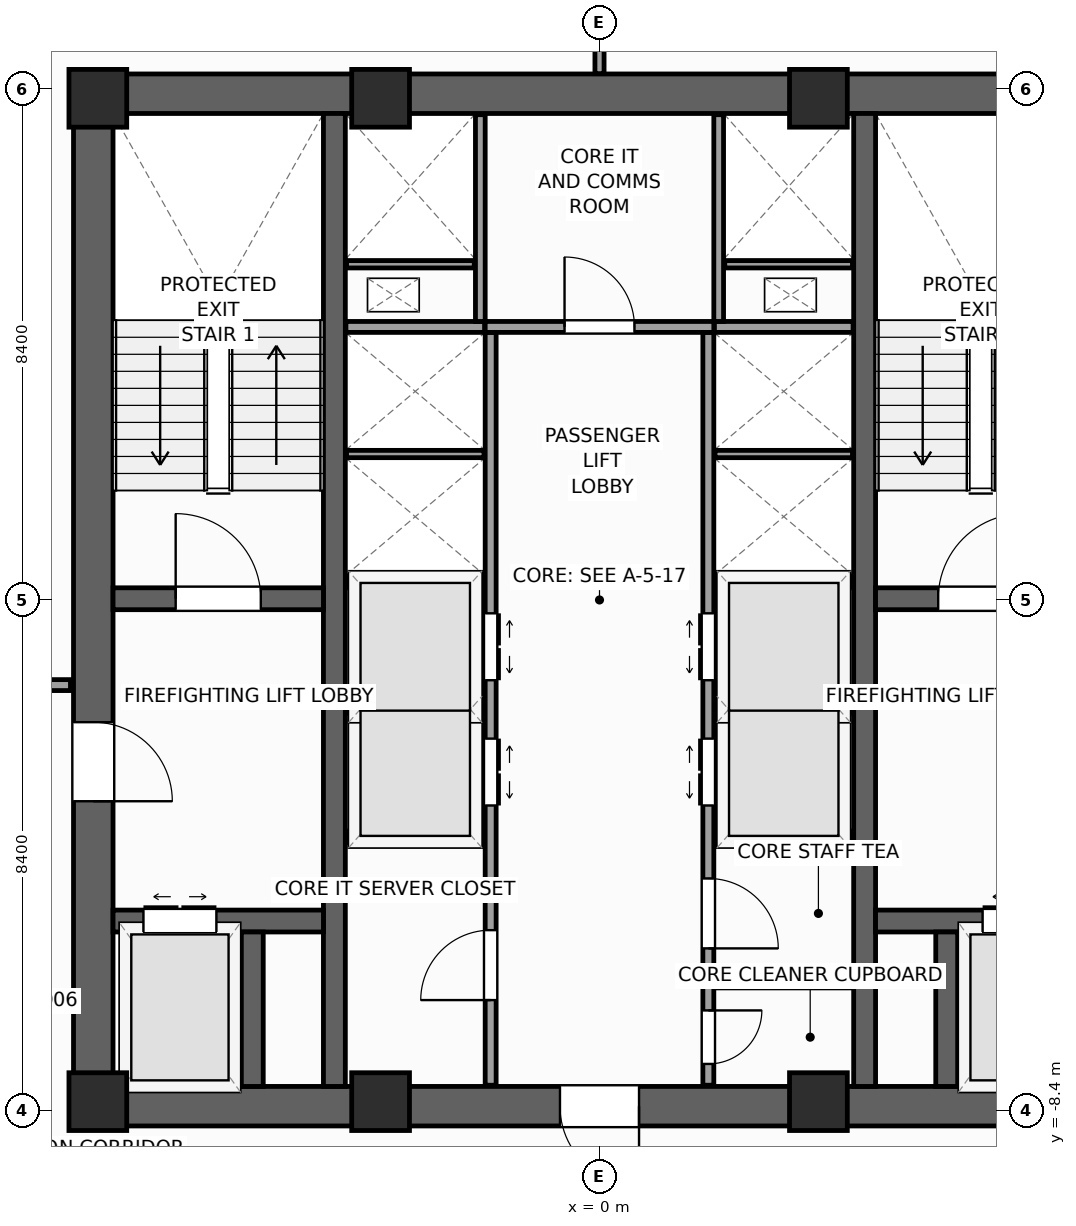
"""IFC4 building model, lengths in metres.
Left out: names, types, materials, properties, quantities, classifications, styles, units other than length and angle.
Written with IfcOpenShell. Run it as: python <this file> out.ifc"""

import sys

from ifc_helpers import new_model, si_unit, direction, frame, frame_2d, origin, origin_2d, place, context, subcontext, project, spatial, rectangle, extrude, source, transform, mapped, element, fill, save


model = new_model("IFC4")
c1 = context("Model", 3, precision=1e-05, world=origin(), true_north=direction((0.0, 1.0)))
c2 = subcontext(c1, "Body", "Model", "MODEL_VIEW")
j1 = project(units=[si_unit("LENGTHUNIT", "METRE"), si_unit("PLANEANGLEUNIT", "RADIAN")], contexts=[c1])
p1 = place(None, origin())
s1 = spatial("IfcSite", under=j1, at=p1, CompositionType="ELEMENT")
p2 = place(p1, origin())
s2 = spatial("IfcBuilding", under=s1, at=p2, CompositionType="ELEMENT")
p3 = place(p2, frame((0.0, 0.0, 152.4)))
s3 = spatial("IfcBuildingStorey", under=s2, at=p3, CompositionType="ELEMENT", Elevation=152.4)
p4 = place(p3, frame((-8.65, -8.325, 0.0), z_axis=(0.0, 0.0, 1.0), x_axis=(1.0, 0.0, 0.0)))
e1 = element("IfcWall", 1, at=p4, inside=s3, PredefinedType="SHEAR", context=c2, shape_type="SweptSolid", body=[
    extrude(rectangle(XDim=17.3, YDim=0.65, at=frame_2d((8.65, 0.0))), origin(), (0.0, 0.0, 1.0), 4.0),
])
p5 = place(p4, frame((8.0, 0.0, 0.0)))
e2 = element("IfcOpeningElement", 2, at=p5, cuts=e1, PredefinedType="OPENING", context=c2, shape_type="SweptSolid", body=[
    extrude(rectangle(XDim=1.3, YDim=2.2, at=frame_2d((0.65, 1.1))), frame((0.0, 0.335, 0.0), z_axis=(0.0, -1.0, 0.0), x_axis=(1.0, 0.0, 0.0)), (0.0, 0.0, 1.0), 0.67),
])
p6 = place(p3, frame((-8.65, 8.325, 0.0), z_axis=(0.0, 0.0, 1.0), x_axis=(1.0, 0.0, 0.0)))
e3 = element("IfcWall", 3, at=p6, inside=s3, PredefinedType="SHEAR", context=c2, shape_type="SweptSolid", body=[
    extrude(rectangle(XDim=17.3, YDim=0.65, at=frame_2d((8.65, 0.0))), origin(), (0.0, 0.0, 1.0), 4.0),
])
p7 = place(p3, frame((-8.325, -8.0, 0.0), z_axis=(0.0, 0.0, 1.0), x_axis=(0.0, 1.0, 0.0)))
e4 = element("IfcWall", 4, at=p7, inside=s3, PredefinedType="SHEAR", context=c2, shape_type="SweptSolid", body=[
    extrude(rectangle(XDim=16.0, YDim=0.65, at=frame_2d((8.0, 0.0))), origin(), (0.0, 0.0, 1.0), 4.0),
])
p8 = place(p7, frame((4.69, 0.0, 0.0)))
e5 = element("IfcOpeningElement", 5, at=p8, cuts=e4, PredefinedType="OPENING", context=c2, shape_type="SweptSolid", body=[
    extrude(rectangle(XDim=1.3, YDim=2.2, at=frame_2d((0.65, 1.1))), frame((0.0, 0.335, 0.0), z_axis=(0.0, -1.0, 0.0), x_axis=(1.0, 0.0, 0.0)), (0.0, 0.0, 1.0), 0.67),
])
for number, where, z_axis, x_axis in (
    (6, (-4.36, -8.0, 0.0), (0.0, 0.0, 1.0), (0.0, 1.0, 0.0)),
    (7, (4.36, -8.0, 0.0), (0.0, 0.0, 1.0), (0.0, 1.0, 0.0)),
):
    element("IfcWall", number, at=place(p3, frame(where, z_axis=z_axis, x_axis=x_axis)), inside=s3, PredefinedType="SHEAR", context=c2, shape_type="SweptSolid", body=[
        extrude(rectangle(XDim=16.0, YDim=0.36, at=frame_2d((8.0, 0.0))), origin(), (0.0, 0.0, 1.0), 4.0),
    ])
p9 = place(p3, frame((-8.0, 0.02, 0.0), z_axis=(0.0, 0.0, 1.0), x_axis=(1.0, 0.0, 0.0)))
e8 = element("IfcWall", 8, at=p9, inside=s3, PredefinedType="SHEAR", context=c2, shape_type="SweptSolid", body=[
    extrude(rectangle(XDim=3.46, YDim=0.36, at=frame_2d((1.73, 0.0))), origin(), (0.0, 0.0, 1.0), 4.0),
])
p10 = place(p9, frame((1.03, 0.0, 0.0)))
e9 = element("IfcOpeningElement", 9, at=p10, cuts=e8, PredefinedType="OPENING", context=c2, shape_type="SweptSolid", body=[
    extrude(rectangle(XDim=1.4, YDim=2.2, at=frame_2d((0.7, 1.1))), frame((0.0, 0.19, 0.0), z_axis=(0.0, -1.0, 0.0), x_axis=(1.0, 0.0, 0.0)), (0.0, 0.0, 1.0), 0.38),
])
p11 = place(p3, frame((4.54, 0.02, 0.0), z_axis=(0.0, 0.0, 1.0), x_axis=(1.0, 0.0, 0.0)))
e10 = element("IfcWall", 10, at=p11, inside=s3, PredefinedType="SHEAR", context=c2, shape_type="SweptSolid", body=[
    extrude(rectangle(XDim=3.46, YDim=0.36, at=frame_2d((1.73, 0.0))), origin(), (0.0, 0.0, 1.0), 4.0),
])
p12 = place(p11, frame((1.03, 0.0, 0.0)))
e11 = element("IfcOpeningElement", 11, at=p12, cuts=e10, PredefinedType="OPENING", context=c2, shape_type="SweptSolid", body=[
    extrude(rectangle(XDim=1.4, YDim=2.2, at=frame_2d((0.7, 1.1))), frame((0.0, 0.19, 0.0), z_axis=(0.0, -1.0, 0.0), x_axis=(1.0, 0.0, 0.0)), (0.0, 0.0, 1.0), 0.38),
])
p13 = place(p3, frame((-8.0, -5.28, 0.0), z_axis=(0.0, 0.0, 1.0), x_axis=(1.0, 0.0, 0.0)))
e12 = element("IfcWall", 12, at=p13, inside=s3, PredefinedType="SHEAR", context=c2, shape_type="SweptSolid", body=[
    extrude(rectangle(XDim=3.46, YDim=0.36, at=frame_2d((1.73, 0.0))), origin(), (0.0, 0.0, 1.0), 4.0),
])
p14 = place(p13, frame((0.5, 0.0, 0.0)))
e13 = element("IfcOpeningElement", 13, at=p14, cuts=e12, PredefinedType="OPENING", context=c2, shape_type="SweptSolid", body=[
    extrude(rectangle(XDim=1.2, YDim=2.25, at=frame_2d((0.6, 1.125))), frame((0.0, 0.19, 0.0), z_axis=(0.0, -1.0, 0.0), x_axis=(1.0, 0.0, 0.0)), (0.0, 0.0, 1.0), 0.38),
])
p15 = place(p3, frame((4.54, -5.28, 0.0), z_axis=(0.0, 0.0, 1.0), x_axis=(1.0, 0.0, 0.0)))
e14 = element("IfcWall", 14, at=p15, inside=s3, PredefinedType="SHEAR", context=c2, shape_type="SweptSolid", body=[
    extrude(rectangle(XDim=3.46, YDim=0.36, at=frame_2d((1.73, 0.0))), origin(), (0.0, 0.0, 1.0), 4.0),
])
p16 = place(p15, frame((1.76, 0.0, 0.0)))
e15 = element("IfcOpeningElement", 15, at=p16, cuts=e14, PredefinedType="OPENING", context=c2, shape_type="SweptSolid", body=[
    extrude(rectangle(XDim=1.2, YDim=2.25, at=frame_2d((0.6, 1.125))), frame((0.0, 0.19, 0.0), z_axis=(0.0, -1.0, 0.0), x_axis=(1.0, 0.0, 0.0)), (0.0, 0.0, 1.0), 0.38),
])
for number, where, z_axis, x_axis in (
    (16, (-5.71, -8.0, 0.0), (0.0, 0.0, 1.0), (0.0, 1.0, 0.0)),
    (17, (5.71, -8.0, 0.0), (0.0, 0.0, 1.0), (0.0, 1.0, 0.0)),
):
    element("IfcWall", number, at=place(p3, frame(where, z_axis=z_axis, x_axis=x_axis)), inside=s3, PredefinedType="SHEAR", context=c2, shape_type="SweptSolid", body=[
        extrude(rectangle(XDim=2.54, YDim=0.36, at=frame_2d((1.27, 0.0))), origin(), (0.0, 0.0, 1.0), 4.0),
    ])
m1 = source(origin(), c2, "Body", "SweptSolid", [
    extrude(rectangle(XDim=0.95, YDim=0.95, at=origin_2d()), origin(), (0.0, 0.0, 1.0), 4.0),
])
for number, where, z_axis, x_axis in (
    (18, (-8.25, -8.25, 0.0), (0.0, 0.0, 1.0), (1.0, 0.0, 0.0)),
    (19, (-8.25, 8.25, 0.0), (0.0, 0.0, 1.0), (1.0, 0.0, 0.0)),
    (20, (-3.6, -8.25, 0.0), (0.0, 0.0, 1.0), (1.0, 0.0, 0.0)),
    (21, (3.6, -8.25, 0.0), (0.0, 0.0, 1.0), (1.0, 0.0, 0.0)),
    (22, (-3.6, 8.25, 0.0), (0.0, 0.0, 1.0), (1.0, 0.0, 0.0)),
    (23, (3.6, 8.25, 0.0), (0.0, 0.0, 1.0), (1.0, 0.0, 0.0)),
):
    element("IfcColumn", number, at=place(p3, frame(where, z_axis=z_axis, x_axis=x_axis)), inside=s3, PredefinedType="PILASTER", context=c2, shape_type="MappedRepresentation", body=[
        mapped(m1, transform((0.0, 0.0, 0.0), scale=1.0)),
    ])
p17 = place(p3, frame((-1.79, -7.98, 0.0), z_axis=(0.0, 0.0, 1.0), x_axis=(0.0, 1.0, 0.0)))
e24 = element("IfcWall", 24, at=p17, inside=s3, PredefinedType="PARTITIONING", context=c2, shape_type="SweptSolid", body=[
    extrude(rectangle(XDim=12.38, YDim=0.18, at=frame_2d((6.19, 0.0))), origin(), (0.0, 0.0, 1.0), 3.74),
])
p18 = place(p17, frame((4.6, 0.0, 0.0)))
e25 = element("IfcOpeningElement", 25, at=p18, cuts=e24, PredefinedType="OPENING", context=c2, shape_type="SweptSolid", body=[
    extrude(rectangle(XDim=1.1, YDim=2.2, at=frame_2d((0.55, 1.1))), frame((0.0, 0.1, 0.0), z_axis=(0.0, -1.0, 0.0), x_axis=(1.0, 0.0, 0.0)), (0.0, 0.0, 1.0), 0.2),
])
p19 = place(p17, frame((6.66, 0.0, 0.0)))
e26 = element("IfcOpeningElement", 26, at=p19, cuts=e24, PredefinedType="OPENING", context=c2, shape_type="SweptSolid", body=[
    extrude(rectangle(XDim=1.1, YDim=2.2, at=frame_2d((0.55, 1.1))), frame((0.0, 0.1, 0.0), z_axis=(0.0, -1.0, 0.0), x_axis=(1.0, 0.0, 0.0)), (0.0, 0.0, 1.0), 0.2),
])
p20 = place(p17, frame((1.4, 0.0, 0.0)))
e27 = element("IfcOpeningElement", 27, at=p20, cuts=e24, PredefinedType="OPENING", context=c2, shape_type="SweptSolid", body=[
    extrude(rectangle(XDim=1.15, YDim=2.25, at=frame_2d((0.575, 1.125))), frame((0.0, 0.1, 0.0), z_axis=(0.0, -1.0, 0.0), x_axis=(1.0, 0.0, 0.0)), (0.0, 0.0, 1.0), 0.2),
])
p21 = place(p3, frame((1.79, -7.98, 0.0), z_axis=(0.0, 0.0, 1.0), x_axis=(0.0, 1.0, 0.0)))
e28 = element("IfcWall", 28, at=p21, inside=s3, PredefinedType="PARTITIONING", context=c2, shape_type="SweptSolid", body=[
    extrude(rectangle(XDim=12.38, YDim=0.18, at=frame_2d((6.19, 0.0))), origin(), (0.0, 0.0, 1.0), 3.74),
])
p22 = place(p21, frame((4.6, 0.0, 0.0)))
e29 = element("IfcOpeningElement", 29, at=p22, cuts=e28, PredefinedType="OPENING", context=c2, shape_type="SweptSolid", body=[
    extrude(rectangle(XDim=1.1, YDim=2.2, at=frame_2d((0.55, 1.1))), frame((0.0, 0.1, 0.0), z_axis=(0.0, -1.0, 0.0), x_axis=(1.0, 0.0, 0.0)), (0.0, 0.0, 1.0), 0.2),
])
p23 = place(p21, frame((6.66, 0.0, 0.0)))
e30 = element("IfcOpeningElement", 30, at=p23, cuts=e28, PredefinedType="OPENING", context=c2, shape_type="SweptSolid", body=[
    extrude(rectangle(XDim=1.1, YDim=2.2, at=frame_2d((0.55, 1.1))), frame((0.0, 0.1, 0.0), z_axis=(0.0, -1.0, 0.0), x_axis=(1.0, 0.0, 0.0)), (0.0, 0.0, 1.0), 0.2),
])
p24 = place(p21, frame((0.35, 0.0, 0.0)))
e31 = element("IfcOpeningElement", 31, at=p24, cuts=e28, PredefinedType="OPENING", context=c2, shape_type="SweptSolid", body=[
    extrude(rectangle(XDim=0.88, YDim=2.1, at=frame_2d((0.44, 1.05))), frame((0.0, 0.1, 0.0), z_axis=(0.0, -1.0, 0.0), x_axis=(1.0, 0.0, 0.0)), (0.0, 0.0, 1.0), 0.2),
])
p25 = place(p21, frame((2.25, 0.0, 0.0)))
e32 = element("IfcOpeningElement", 32, at=p25, cuts=e28, PredefinedType="OPENING", context=c2, shape_type="SweptSolid", body=[
    extrude(rectangle(XDim=1.15, YDim=2.25, at=frame_2d((0.575, 1.125))), frame((0.0, 0.1, 0.0), z_axis=(0.0, -1.0, 0.0), x_axis=(1.0, 0.0, 0.0)), (0.0, 0.0, 1.0), 0.2),
])
p26 = place(p3, frame((-1.88, 4.49, 0.0), z_axis=(0.0, 0.0, 1.0), x_axis=(1.0, 0.0, 0.0)))
e33 = element("IfcWall", 33, at=p26, inside=s3, PredefinedType="PARTITIONING", context=c2, shape_type="SweptSolid", body=[
    extrude(rectangle(XDim=3.76, YDim=0.18, at=frame_2d((1.88, 0.0))), origin(), (0.0, 0.0, 1.0), 3.74),
])
p27 = place(p26, frame((1.305, 0.0, 0.0)))
e34 = element("IfcOpeningElement", 34, at=p27, cuts=e33, PredefinedType="OPENING", context=c2, shape_type="SweptSolid", body=[
    extrude(rectangle(XDim=1.15, YDim=2.25, at=frame_2d((0.575, 1.125))), frame((0.0, 0.1, 0.0), z_axis=(0.0, -1.0, 0.0), x_axis=(1.0, 0.0, 0.0)), (0.0, 0.0, 1.0), 0.2),
])
for number, where, z_axis, x_axis in (
    (35, (-4.17, -3.9, 0.0), (0.0, 0.0, 1.0), (1.0, 0.0, 0.0)),
    (36, (1.89, -3.9, 0.0), (0.0, 0.0, 1.0), (1.0, 0.0, 0.0)),
    (37, (-4.17, 0.3, 0.0), (0.0, 0.0, 1.0), (1.0, 0.0, 0.0)),
    (38, (1.89, 0.3, 0.0), (0.0, 0.0, 1.0), (1.0, 0.0, 0.0)),
    (39, (-4.17, 4.49, 0.0), (0.0, 0.0, 1.0), (1.0, 0.0, 0.0)),
    (40, (1.89, 4.49, 0.0), (0.0, 0.0, 1.0), (1.0, 0.0, 0.0)),
):
    element("IfcWall", number, at=place(p3, frame(where, z_axis=z_axis, x_axis=x_axis)), inside=s3, PredefinedType="PARTITIONING", context=c2, shape_type="SweptSolid", body=[
        extrude(rectangle(XDim=2.28, YDim=0.18, at=frame_2d((1.14, 0.0))), origin(), (0.0, 0.0, 1.0), 3.74),
    ])
for number, where, z_axis, x_axis in (
    (41, (-4.16, -1.8, 0.0), (0.0, 0.0, 1.0), (1.0, 0.0, 0.0)),
    (42, (1.9, -1.8, 0.0), (0.0, 0.0, 1.0), (1.0, 0.0, 0.0)),
    (43, (-4.16, 2.4, 0.0), (0.0, 0.0, 1.0), (1.0, 0.0, 0.0)),
    (44, (1.9, 2.4, 0.0), (0.0, 0.0, 1.0), (1.0, 0.0, 0.0)),
):
    element("IfcWall", number, at=place(p3, frame(where, z_axis=z_axis, x_axis=x_axis)), inside=s3, PredefinedType="PARTITIONING", context=c2, shape_type="SweptSolid", body=[
        extrude(rectangle(XDim=2.26, YDim=0.12, at=frame_2d((1.13, 0.0))), origin(), (0.0, 0.0, 1.0), 3.74),
    ])
p28 = place(p3, frame((1.89, -6.3, 0.0), z_axis=(0.0, 0.0, 1.0), x_axis=(1.0, 0.0, 0.0)))
e45 = element("IfcWall", 45, at=p28, inside=s3, PredefinedType="PARTITIONING", context=c2, shape_type="SweptSolid", body=[
    extrude(rectangle(XDim=2.28, YDim=0.16, at=frame_2d((1.14, 0.0))), origin(), (0.0, 0.0, 1.0), 3.74),
])
for number, where, z_axis, x_axis in (
    (46, (-1.96, 4.58, 0.0), (0.0, 0.0, 1.0), (0.0, 1.0, 0.0)),
    (47, (1.96, 4.58, 0.0), (0.0, 0.0, 1.0), (0.0, 1.0, 0.0)),
):
    element("IfcWall", number, at=place(p3, frame(where, z_axis=z_axis, x_axis=x_axis)), inside=s3, PredefinedType="PARTITIONING", context=c2, shape_type="SweptSolid", body=[
        extrude(rectangle(XDim=3.4, YDim=0.16, at=frame_2d((1.7, 0.0))), origin(), (0.0, 0.0, 1.0), 3.74),
    ])
for number, where, z_axis, x_axis in (
    (48, (-4.16, 5.52, 0.0), (0.0, 0.0, 1.0), (1.0, 0.0, 0.0)),
    (49, (2.06, 5.52, 0.0), (0.0, 0.0, 1.0), (1.0, 0.0, 0.0)),
):
    element("IfcWall", number, at=place(p3, frame(where, z_axis=z_axis, x_axis=x_axis)), inside=s3, PredefinedType="PARTITIONING", context=c2, shape_type="SweptSolid", body=[
        extrude(rectangle(XDim=2.1, YDim=0.12, at=frame_2d((1.05, 0.0))), origin(), (0.0, 0.0, 1.0), 3.74),
    ])
p29 = place(p3, frame((-10.45, -1.4, 0.0), z_axis=(0.0, 0.0, 1.0), x_axis=(1.0, 0.0, 0.0)))
e50 = element("IfcWall", 50, at=p29, inside=s3, PredefinedType="PARTITIONING", context=c2, shape_type="SweptSolid", body=[
    extrude(rectangle(XDim=1.75, YDim=0.18, at=frame_2d((0.875, 0.0))), origin(), (0.0, 0.0, 1.0), 3.74),
])
p30 = place(p29, frame((0.325, 0.0, 0.0)))
e51 = element("IfcOpeningElement", 51, at=p30, cuts=e50, PredefinedType="OPENING", context=c2, shape_type="SweptSolid", body=[
    extrude(rectangle(XDim=1.1, YDim=2.2, at=frame_2d((0.55, 1.1))), frame((0.0, 0.1, 0.0), z_axis=(0.0, -1.0, 0.0), x_axis=(1.0, 0.0, 0.0)), (0.0, 0.0, 1.0), 0.2),
])
p31 = place(p3, frame((0.0, 8.655, 0.0), z_axis=(0.0, 0.0, 1.0), x_axis=(0.0, 1.0, 0.0)))
e52 = element("IfcWall", 52, at=p31, inside=s3, PredefinedType="PARTITIONING", context=c2, shape_type="SweptSolid", body=[
    extrude(rectangle(XDim=21.772, YDim=0.15, at=frame_2d((10.886, 0.0))), origin(), (0.0, 0.0, 1.0), 3.74),
])
m2 = source(origin(), c2, "Body", "SweptSolid", [
    extrude(rectangle(XDim=1.4, YDim=2.2, at=frame_2d((0.7, 1.1))), frame((0.0, 0.025, 0.0), z_axis=(0.0, -1.0, 0.0), x_axis=(1.0, 0.0, 0.0)), (0.0, 0.0, 1.0), 0.05),
])
p32 = place(p10, origin())
e53 = element("IfcDoor", 53, at=p32, inside=s3, OperationType="SINGLE_SWING_LEFT", PredefinedType="DOOR", context=c2, shape_type="MappedRepresentation", body=[
    mapped(m2, transform((0.0, 0.0, 0.0), scale=1.0)),
])
fill(e9, e53)
p33 = place(p12, origin())
e54 = element("IfcDoor", 54, at=p33, inside=s3, OperationType="SINGLE_SWING_RIGHT", PredefinedType="DOOR", context=c2, shape_type="MappedRepresentation", body=[
    mapped(m2, transform((0.0, 0.0, 0.0), scale=1.0)),
])
fill(e11, e54)
m3 = source(origin(), c2, "Body", "SweptSolid", [
    extrude(rectangle(XDim=1.3, YDim=2.2, at=frame_2d((0.65, 1.1))), frame((0.0, 0.025, 0.0), z_axis=(0.0, -1.0, 0.0), x_axis=(1.0, 0.0, 0.0)), (0.0, 0.0, 1.0), 0.05),
])
p34 = place(p8, frame((1.3, 0.0, 0.0), z_axis=(0.0, 0.0, 1.0), x_axis=(-1.0, 0.0, 0.0)))
e55 = element("IfcDoor", 55, at=p34, inside=s3, OperationType="SINGLE_SWING_LEFT", PredefinedType="DOOR", context=c2, shape_type="MappedRepresentation", body=[
    mapped(m3, transform((0.0, 0.0, 0.0), scale=1.0)),
])
fill(e5, e55)
p35 = place(p5, frame((1.3, 0.0, 0.0), z_axis=(0.0, 0.0, 1.0), x_axis=(-1.0, 0.0, 0.0)))
e56 = element("IfcDoor", 56, at=p35, inside=s3, OperationType="SINGLE_SWING_RIGHT", PredefinedType="DOOR", context=c2, shape_type="MappedRepresentation", body=[
    mapped(m3, transform((0.0, 0.0, 0.0), scale=1.0)),
])
fill(e2, e56)
m4 = source(origin(), c2, "Body", "SweptSolid", [
    extrude(rectangle(XDim=1.2, YDim=2.25, at=frame_2d((0.6, 1.125))), frame((0.0, 0.025, 0.0), z_axis=(0.0, -1.0, 0.0), x_axis=(1.0, 0.0, 0.0)), (0.0, 0.0, 1.0), 0.05),
])
p36 = place(p14, origin())
e57 = element("IfcDoor", 57, at=p36, inside=s3, OperationType="DOUBLE_DOOR_SLIDING", PredefinedType="DOOR", context=c2, shape_type="MappedRepresentation", body=[
    mapped(m4, transform((0.0, 0.0, 0.0), scale=1.0)),
])
fill(e13, e57)
p37 = place(p16, origin())
e58 = element("IfcDoor", 58, at=p37, inside=s3, OperationType="DOUBLE_DOOR_SLIDING", PredefinedType="DOOR", context=c2, shape_type="MappedRepresentation", body=[
    mapped(m4, transform((0.0, 0.0, 0.0), scale=1.0)),
])
fill(e15, e58)
m5 = source(origin(), c2, "Body", "SweptSolid", [
    extrude(rectangle(XDim=1.1, YDim=2.2, at=frame_2d((0.55, 1.1))), frame((0.0, 0.025, 0.0), z_axis=(0.0, -1.0, 0.0), x_axis=(1.0, 0.0, 0.0)), (0.0, 0.0, 1.0), 0.05),
])
p38 = place(p18, frame((1.1, 0.0, 0.0), z_axis=(0.0, 0.0, 1.0), x_axis=(-1.0, 0.0, 0.0)))
e59 = element("IfcDoor", 59, at=p38, inside=s3, OperationType="DOUBLE_DOOR_SLIDING", PredefinedType="DOOR", context=c2, shape_type="MappedRepresentation", body=[
    mapped(m5, transform((0.0, 0.0, 0.0), scale=1.0)),
])
fill(e25, e59)
p39 = place(p19, frame((1.1, 0.0, 0.0), z_axis=(0.0, 0.0, 1.0), x_axis=(-1.0, 0.0, 0.0)))
e60 = element("IfcDoor", 60, at=p39, inside=s3, OperationType="DOUBLE_DOOR_SLIDING", PredefinedType="DOOR", context=c2, shape_type="MappedRepresentation", body=[
    mapped(m5, transform((0.0, 0.0, 0.0), scale=1.0)),
])
fill(e26, e60)
p40 = place(p22, origin())
e61 = element("IfcDoor", 61, at=p40, inside=s3, OperationType="DOUBLE_DOOR_SLIDING", PredefinedType="DOOR", context=c2, shape_type="MappedRepresentation", body=[
    mapped(m5, transform((0.0, 0.0, 0.0), scale=1.0)),
])
fill(e29, e61)
p41 = place(p23, origin())
e62 = element("IfcDoor", 62, at=p41, inside=s3, OperationType="DOUBLE_DOOR_SLIDING", PredefinedType="DOOR", context=c2, shape_type="MappedRepresentation", body=[
    mapped(m5, transform((0.0, 0.0, 0.0), scale=1.0)),
])
fill(e30, e62)
m6 = source(origin(), c2, "Body", "SweptSolid", [
    extrude(rectangle(XDim=1.15, YDim=2.25, at=frame_2d((0.575, 1.125))), frame((0.0, 0.025, 0.0), z_axis=(0.0, -1.0, 0.0), x_axis=(1.0, 0.0, 0.0)), (0.0, 0.0, 1.0), 0.05),
])
p42 = place(p20, origin())
e63 = element("IfcDoor", 63, at=p42, inside=s3, OperationType="SINGLE_SWING_LEFT", PredefinedType="DOOR", context=c2, shape_type="MappedRepresentation", body=[
    mapped(m6, transform((0.0, 0.0, 0.0), scale=1.0)),
])
fill(e27, e63)
m7 = source(origin(), c2, "Body", "SweptSolid", [
    extrude(rectangle(XDim=0.88, YDim=2.1, at=frame_2d((0.44, 1.05))), frame((0.0, 0.025, 0.0), z_axis=(0.0, -1.0, 0.0), x_axis=(1.0, 0.0, 0.0)), (0.0, 0.0, 1.0), 0.05),
])
p43 = place(p24, frame((0.88, 0.0, 0.0), z_axis=(0.0, 0.0, 1.0), x_axis=(-1.0, 0.0, 0.0)))
e64 = element("IfcDoor", 64, at=p43, inside=s3, OperationType="SINGLE_SWING_RIGHT", PredefinedType="DOOR", context=c2, shape_type="MappedRepresentation", body=[
    mapped(m7, transform((0.0, 0.0, 0.0), scale=1.0)),
])
fill(e31, e64)
p44 = place(p25, frame((1.15, 0.0, 0.0), z_axis=(0.0, 0.0, 1.0), x_axis=(-1.0, 0.0, 0.0)))
e65 = element("IfcDoor", 65, at=p44, inside=s3, OperationType="SINGLE_SWING_LEFT", PredefinedType="DOOR", context=c2, shape_type="MappedRepresentation", body=[
    mapped(m6, transform((0.0, 0.0, 0.0), scale=1.0)),
])
fill(e32, e65)
p45 = place(p27, origin())
e66 = element("IfcDoor", 66, at=p45, inside=s3, OperationType="SINGLE_SWING_LEFT", PredefinedType="DOOR", context=c2, shape_type="MappedRepresentation", body=[
    mapped(m6, transform((0.0, 0.0, 0.0), scale=1.0)),
])
fill(e34, e66)
save(model, sys.argv[1])
